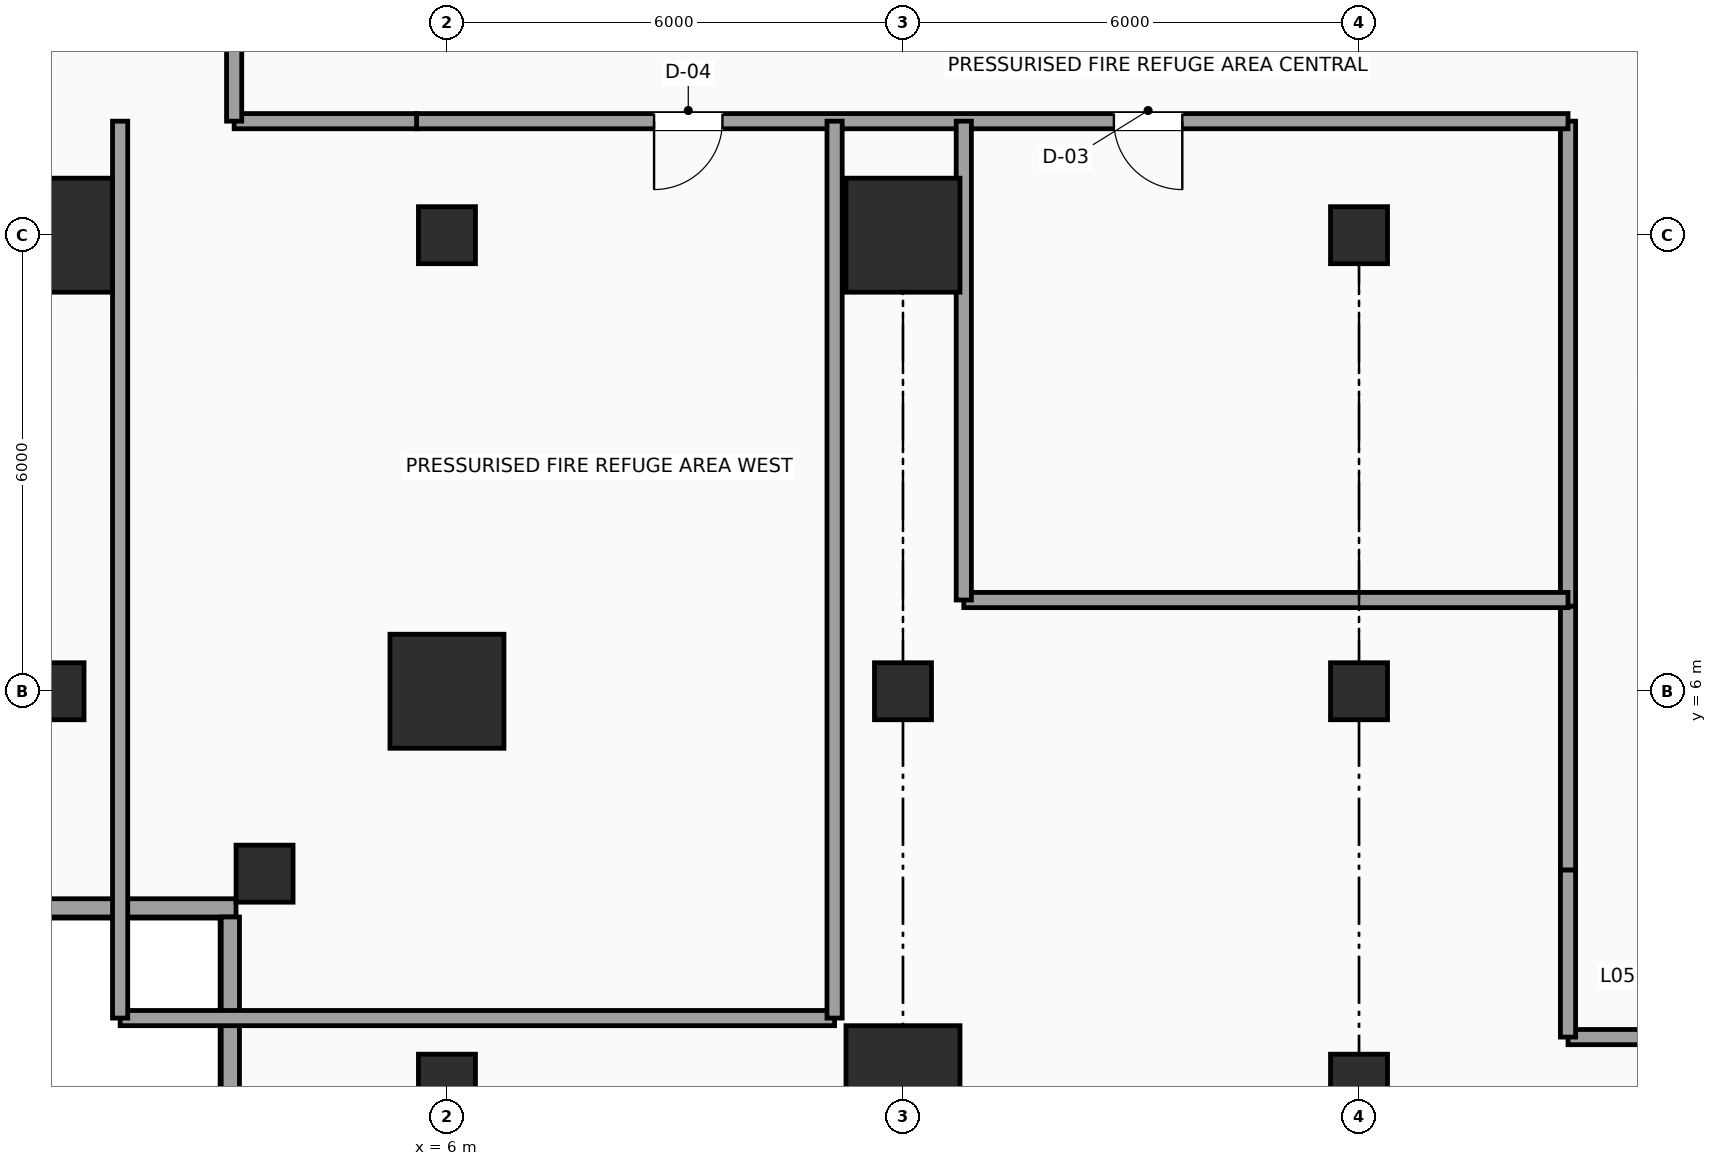
"""IFC4 building model, lengths in metres.
Left out: names, types, materials, properties, quantities, classifications, styles, units other than length and angle.
Written with IfcOpenShell. Run it as: python <this file> out.ifc"""

import sys

from ifc_helpers import new_model, si_unit, direction, frame, frame_2d, origin, origin_2d, place, context, subcontext, project, spatial, rectangle, hollow_rectangle, extrude, element, fill, save


model = new_model("IFC4")
c1 = context("Model", 3, precision=1e-05, world=origin(), true_north=direction((0.0, 1.0)))
c2 = subcontext(c1, "Body", "Model", "MODEL_VIEW")
j1 = project(units=[si_unit("LENGTHUNIT", "METRE"), si_unit("PLANEANGLEUNIT", "RADIAN")], contexts=[c1])
p1 = place(None, origin())
s1 = spatial("IfcSite", under=j1, at=p1, CompositionType="ELEMENT")
p2 = place(p1, origin())
s2 = spatial("IfcBuilding", under=s1, at=p2, CompositionType="ELEMENT")
p3 = place(p2, frame((0.0, 0.0, 27.6)))
s3 = spatial("IfcBuildingStorey", under=s2, at=p3, CompositionType="ELEMENT", Elevation=27.6)
for number, where, z_axis, x_axis in (
    (1, (3.6, 3.6, 0.0), (0.0, 0.0, 1.0), (1.0, 0.0, 0.0)),
    (2, (0.85, 6.0, 0.0), (0.0, 0.0, 1.0), (1.0, 0.0, 0.0)),
):
    element("IfcColumn", number, at=place(p3, frame(where, z_axis=z_axis, x_axis=x_axis)), inside=s3, PredefinedType="COLUMN", context=c2, shape_type="SweptSolid", body=[
        extrude(hollow_rectangle(XDim=0.75, YDim=0.75, WallThickness=0.035, InnerFilletRadius=0.035, OuterFilletRadius=0.05, at=origin_2d()), origin(), (0.0, 0.0, 1.0), 4.8),
    ])
p4 = place(p3, frame((0.85, 12.0, 0.0), z_axis=(0.0, 0.0, 1.0), x_axis=(1.0, 0.0, 0.0)))
e3 = element("IfcColumn", 3, at=p4, inside=s3, PredefinedType="COLUMN", context=c2, shape_type="SweptSolid", body=[
    extrude(rectangle(XDim=1.5, YDim=1.5, at=origin_2d()), origin(), (0.0, 0.0, 1.0), 4.8),
])
p5 = place(p3, frame((6.0, 0.85, 0.0), z_axis=(0.0, 0.0, 1.0), x_axis=(1.0, 0.0, 0.0)))
e4 = element("IfcColumn", 4, at=p5, inside=s3, PredefinedType="COLUMN", context=c2, shape_type="SweptSolid", body=[
    extrude(hollow_rectangle(XDim=0.75, YDim=0.75, WallThickness=0.035, InnerFilletRadius=0.035, OuterFilletRadius=0.05, at=origin_2d()), origin(), (0.0, 0.0, 1.0), 4.8),
])
p6 = place(p3, frame((6.0, 6.0, 0.0), z_axis=(0.0, 0.0, 1.0), x_axis=(1.0, 0.0, 0.0)))
e5 = element("IfcColumn", 5, at=p6, inside=s3, PredefinedType="COLUMN", context=c2, shape_type="SweptSolid", body=[
    extrude(rectangle(XDim=1.5, YDim=1.5, at=origin_2d()), origin(), (0.0, 0.0, 1.0), 4.8),
])
p7 = place(p3, frame((6.0, 12.0, 0.0), z_axis=(0.0, 0.0, 1.0), x_axis=(1.0, 0.0, 0.0)))
e6 = element("IfcColumn", 6, at=p7, inside=s3, PredefinedType="COLUMN", context=c2, shape_type="SweptSolid", body=[
    extrude(hollow_rectangle(XDim=0.75, YDim=0.75, WallThickness=0.035, InnerFilletRadius=0.035, OuterFilletRadius=0.05, at=origin_2d()), origin(), (0.0, 0.0, 1.0), 4.8),
])
p8 = place(p3, frame((12.0, 0.85, -0.35), z_axis=(0.0, 0.0, 1.0), x_axis=(1.0, 0.0, 0.0)))
e7 = element("IfcColumn", 7, at=p8, inside=s3, PredefinedType="COLUMN", context=c2, shape_type="SweptSolid", body=[
    extrude(rectangle(XDim=1.5, YDim=1.5, at=origin_2d()), origin(), (0.0, 0.0, 1.0), 5.15),
])
p9 = place(p3, frame((12.0, 6.0, -0.35), z_axis=(0.0, 0.0, 1.0), x_axis=(1.0, 0.0, 0.0)))
e8 = element("IfcColumn", 8, at=p9, inside=s3, PredefinedType="COLUMN", context=c2, shape_type="SweptSolid", body=[
    extrude(hollow_rectangle(XDim=0.75, YDim=0.75, WallThickness=0.035, InnerFilletRadius=0.035, OuterFilletRadius=0.05, at=origin_2d()), origin(), (0.0, 0.0, 1.0), 5.15),
])
p10 = place(p3, frame((12.0, 12.0, -0.35), z_axis=(0.0, 0.0, 1.0), x_axis=(1.0, 0.0, 0.0)))
e9 = element("IfcColumn", 9, at=p10, inside=s3, PredefinedType="COLUMN", context=c2, shape_type="SweptSolid", body=[
    extrude(rectangle(XDim=1.5, YDim=1.5, at=origin_2d()), origin(), (0.0, 0.0, 1.0), 5.15),
])
for number, where, z_axis, x_axis in (
    (10, (18.0, 0.85, -0.35), (0.0, 0.0, 1.0), (1.0, 0.0, 0.0)),
    (11, (18.0, 6.0, -0.35), (0.0, 0.0, 1.0), (1.0, 0.0, 0.0)),
    (12, (18.0, 12.0, -0.35), (0.0, 0.0, 1.0), (1.0, 0.0, 0.0)),
):
    element("IfcColumn", number, at=place(p3, frame(where, z_axis=z_axis, x_axis=x_axis)), inside=s3, PredefinedType="COLUMN", context=c2, shape_type="SweptSolid", body=[
        extrude(hollow_rectangle(XDim=0.75, YDim=0.75, WallThickness=0.035, InnerFilletRadius=0.035, OuterFilletRadius=0.05, at=origin_2d()), origin(), (0.0, 0.0, 1.0), 5.15),
    ])
p11 = place(p3, frame((3.225, 3.15, 0.0), z_axis=(0.0, 0.0, 1.0), x_axis=(-1.0, 0.0, 0.0)))
e13 = element("IfcWall", 13, at=p11, inside=s3, PredefinedType="SOLIDWALL", context=c2, shape_type="SweptSolid", body=[
    extrude(rectangle(XDim=2.97, YDim=0.24, at=frame_2d((1.485, 0.0))), origin(), (0.0, 0.0, 1.0), 4.55),
])
p12 = place(p3, frame((3.15, 0.255, 0.0), z_axis=(0.0, 0.0, 1.0), x_axis=(0.0, 1.0, 0.0)))
e14 = element("IfcWall", 14, at=p12, inside=s3, PredefinedType="SOLIDWALL", context=c2, shape_type="SweptSolid", body=[
    extrude(rectangle(XDim=2.775, YDim=0.24, at=frame_2d((1.388, 0.0))), origin(), (0.0, 0.0, 1.0), 4.55),
])
p13 = place(p3, frame((23.98, 1.45, 0.0), z_axis=(0.0, 0.0, 1.0), x_axis=(-1.0, 0.0, 0.0)))
e15 = element("IfcWall", 15, at=p13, inside=s3, PredefinedType="SOLIDWALL", context=c2, shape_type="SweptSolid", body=[
    extrude(rectangle(XDim=3.23, YDim=0.2, at=frame_2d((1.615, 0.0))), origin(), (0.0, 0.0, 1.0), 4.55),
])
p14 = place(p3, frame((20.75, 1.45, 0.0), z_axis=(0.0, 0.0, 1.0), x_axis=(0.0, 1.0, 0.0)))
e16 = element("IfcWall", 16, at=p14, inside=s3, PredefinedType="SOLIDWALL", context=c2, shape_type="SweptSolid", body=[
    extrude(rectangle(XDim=2.2, YDim=0.2, at=frame_2d((1.1, 0.0))), origin(), (0.0, 0.0, 1.0), 4.55),
])
p15 = place(p3, frame((20.75, 3.65, 0.0), z_axis=(0.0, 0.0, 1.0), x_axis=(0.0, 1.0, 0.0)))
e17 = element("IfcWall", 17, at=p15, inside=s3, PredefinedType="SOLIDWALL", context=c2, shape_type="SweptSolid", body=[
    extrude(rectangle(XDim=3.47, YDim=0.2, at=frame_2d((1.735, 0.0))), origin(), (0.0, 0.0, 1.0), 4.55),
])
p16 = place(p3, frame((20.75, 7.12, 0.0), z_axis=(0.0, 0.0, 1.0), x_axis=(0.0, 1.0, 0.0)))
e18 = element("IfcWall", 18, at=p16, inside=s3, PredefinedType="SOLIDWALL", context=c2, shape_type="SweptSolid", body=[
    extrude(rectangle(XDim=6.38, YDim=0.2, at=frame_2d((3.19, 0.0))), origin(), (0.0, 0.0, 1.0), 4.55),
])
p17 = place(p3, frame((20.75, 13.5, 0.0), z_axis=(0.0, 0.0, 1.0), x_axis=(-1.0, 0.0, 0.0)))
e19 = element("IfcWall", 19, at=p17, inside=s3, PredefinedType="SOLIDWALL", context=c2, shape_type="SweptSolid", body=[
    extrude(rectangle(XDim=15.15, YDim=0.2, at=frame_2d((7.575, 0.0))), origin(), (0.0, 0.0, 1.0), 4.55),
])
p18 = place(p17, frame((11.125, 0.0, 0.0)))
e20 = element("IfcOpeningElement", 20, at=p18, cuts=e19, PredefinedType="OPENING", context=c2, shape_type="SweptSolid", body=[
    extrude(rectangle(XDim=0.9, YDim=2.15, at=frame_2d((0.45, 1.075))), frame((0.0, 0.11, 0.0), z_axis=(0.0, -1.0, 0.0), x_axis=(1.0, 0.0, 0.0)), (0.0, 0.0, 1.0), 0.22),
])
p19 = place(p17, frame((5.075, 0.0, 0.0)))
e21 = element("IfcOpeningElement", 21, at=p19, cuts=e19, PredefinedType="OPENING", context=c2, shape_type="SweptSolid", body=[
    extrude(rectangle(XDim=0.9, YDim=2.15, at=frame_2d((0.45, 1.075))), frame((0.0, 0.11, 0.0), z_axis=(0.0, -1.0, 0.0), x_axis=(1.0, 0.0, 0.0)), (0.0, 0.0, 1.0), 0.22),
])
p20 = place(p3, frame((5.6, 13.5, 0.0), z_axis=(0.0, 0.0, 1.0), x_axis=(-1.0, 0.0, 0.0)))
e22 = element("IfcWall", 22, at=p20, inside=s3, PredefinedType="SOLIDWALL", context=c2, shape_type="SweptSolid", body=[
    extrude(rectangle(XDim=2.4, YDim=0.2, at=frame_2d((1.2, 0.0))), origin(), (0.0, 0.0, 1.0), 4.55),
])
p21 = place(p3, frame((3.2, 13.5, 0.0), z_axis=(0.0, 0.0, 1.0), x_axis=(0.0, 1.0, 0.0)))
e23 = element("IfcWall", 23, at=p21, inside=s3, PredefinedType="SOLIDWALL", context=c2, shape_type="SweptSolid", body=[
    extrude(rectangle(XDim=2.95, YDim=0.2, at=frame_2d((1.475, 0.0))), origin(), (0.0, 0.0, 1.0), 4.55),
])
p22 = place(p3, frame((1.7, 1.7, 0.0), z_axis=(0.0, 0.0, 1.0), x_axis=(1.0, 0.0, 0.0)))
e24 = element("IfcWall", 24, at=p22, inside=s3, PredefinedType="SOLIDWALL", context=c2, shape_type="SweptSolid", body=[
    extrude(rectangle(XDim=9.4, YDim=0.2, at=frame_2d((4.7, 0.0))), origin(), (0.0, 0.0, 1.0), 4.55),
])
for number, where, z_axis, x_axis in (
    (25, (1.7, 1.7, 0.0), (0.0, 0.0, 1.0), (0.0, 1.0, 0.0)),
    (26, (11.1, 1.7, 0.0), (0.0, 0.0, 1.0), (0.0, 1.0, 0.0)),
):
    element("IfcWall", number, at=place(p3, frame(where, z_axis=z_axis, x_axis=x_axis)), inside=s3, PredefinedType="SOLIDWALL", context=c2, shape_type="SweptSolid", body=[
        extrude(rectangle(XDim=11.8, YDim=0.2, at=frame_2d((5.9, 0.0))), origin(), (0.0, 0.0, 1.0), 4.55),
    ])
p23 = place(p3, frame((12.8, 7.2, 0.0), z_axis=(0.0, 0.0, 1.0), x_axis=(1.0, 0.0, 0.0)))
e27 = element("IfcWall", 27, at=p23, inside=s3, PredefinedType="SOLIDWALL", context=c2, shape_type="SweptSolid", body=[
    extrude(rectangle(XDim=7.95, YDim=0.2, at=frame_2d((3.975, 0.0))), origin(), (0.0, 0.0, 1.0), 4.55),
])
p24 = place(p3, frame((12.8, 7.2, 0.0), z_axis=(0.0, 0.0, 1.0), x_axis=(0.0, 1.0, 0.0)))
e28 = element("IfcWall", 28, at=p24, inside=s3, PredefinedType="SOLIDWALL", context=c2, shape_type="SweptSolid", body=[
    extrude(rectangle(XDim=6.3, YDim=0.2, at=frame_2d((3.15, 0.0))), origin(), (0.0, 0.0, 1.0), 4.55),
])
p25 = place(p18, origin())
e29 = element("IfcDoor", 29, at=p25, inside=s3, OperationType="SINGLE_SWING_RIGHT", PredefinedType="DOOR", context=c2, shape_type="SweptSolid", body=[
    extrude(rectangle(XDim=0.9, YDim=2.15, at=frame_2d((0.45, 1.075))), frame((0.0, 0.025, 0.0), z_axis=(0.0, -1.0, 0.0), x_axis=(1.0, 0.0, 0.0)), (0.0, 0.0, 1.0), 0.05),
])
fill(e20, e29)
p26 = place(p19, origin())
e30 = element("IfcDoor", 30, at=p26, inside=s3, OperationType="SINGLE_SWING_LEFT", PredefinedType="DOOR", context=c2, shape_type="SweptSolid", body=[
    extrude(rectangle(XDim=0.9, YDim=2.15, at=frame_2d((0.45, 1.075))), frame((0.0, 0.025, 0.0), z_axis=(0.0, -1.0, 0.0), x_axis=(1.0, 0.0, 0.0)), (0.0, 0.0, 1.0), 0.05),
])
fill(e21, e30)
save(model, sys.argv[1])
